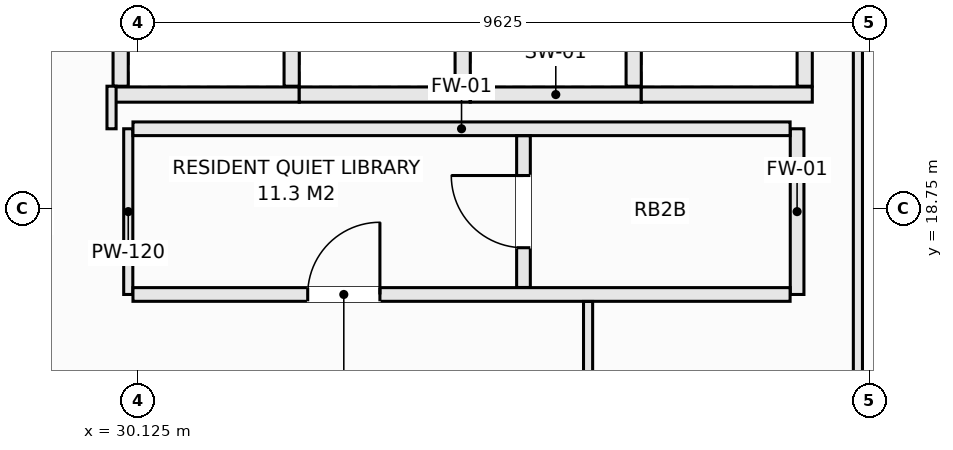
"""IFC4 building model, lengths in metres.
Left out: names, types, materials, properties, quantities, classifications, styles, units other than length and angle.
Written with IfcOpenShell. Run it as: python <this file> out.ifc"""

import sys

from ifc_helpers import new_model, si_unit, direction, frame, frame_2d, origin, place, context, subcontext, project, spatial, rectangle, extrude, element, fill, save


model = new_model("IFC4")
c1 = context("Model", 3, precision=1e-05, world=origin(), true_north=direction((0.0, 1.0)))
c2 = subcontext(c1, "Body", "Model", "MODEL_VIEW")
j1 = project(units=[si_unit("LENGTHUNIT", "METRE"), si_unit("PLANEANGLEUNIT", "RADIAN")], contexts=[c1])
p1 = place(None, origin())
s1 = spatial("IfcSite", under=j1, at=p1, CompositionType="ELEMENT")
p2 = place(p1, origin())
s2 = spatial("IfcBuilding", under=s1, at=p2, CompositionType="ELEMENT")
p3 = place(p2, frame((0.0, 0.0, 226.1)))
s3 = spatial("IfcBuildingStorey", under=s2, at=p3, CompositionType="ELEMENT", Elevation=226.1)
p4 = place(p3, frame((29.8, 20.25, 0.0), z_axis=(0.0, 0.0, 1.0), x_axis=(1.0, 0.0, 0.0)))
e1 = element("IfcWall", 1, at=p4, inside=s3, PredefinedType="SOLIDWALL", context=c2, shape_type="SweptSolid", body=[
    extrude(rectangle(XDim=2.45, YDim=0.2, at=frame_2d((1.225, 0.0))), origin(), (0.0, 0.0, 1.0), 3.03),
])
for number, where, z_axis, x_axis in (
    (2, (29.9, 20.36, 0.0), (0.0, 0.0, 1.0), (0.0, 1.0, 0.0)),
    (3, (32.15, 20.36, 0.0), (0.0, 0.0, 1.0), (0.0, 1.0, 0.0)),
):
    element("IfcWall", number, at=place(p3, frame(where, z_axis=z_axis, x_axis=x_axis)), inside=s3, PredefinedType="SOLIDWALL", context=c2, shape_type="SweptSolid", body=[
        extrude(rectangle(XDim=2.43, YDim=0.2, at=frame_2d((1.215, 0.0))), origin(), (0.0, 0.0, 1.0), 3.03),
    ])
p5 = place(p3, frame((32.25, 20.25, 0.0), z_axis=(0.0, 0.0, 1.0), x_axis=(1.0, 0.0, 0.0)))
e4 = element("IfcWall", 4, at=p5, inside=s3, PredefinedType="SOLIDWALL", context=c2, shape_type="SweptSolid", body=[
    extrude(rectangle(XDim=2.25, YDim=0.2, at=frame_2d((1.125, 0.0))), origin(), (0.0, 0.0, 1.0), 3.03),
])
p6 = place(p3, frame((34.4, 20.36, 0.0), z_axis=(0.0, 0.0, 1.0), x_axis=(0.0, 1.0, 0.0)))
e5 = element("IfcWall", 5, at=p6, inside=s3, PredefinedType="SOLIDWALL", context=c2, shape_type="SweptSolid", body=[
    extrude(rectangle(XDim=2.43, YDim=0.2, at=frame_2d((1.215, 0.0))), origin(), (0.0, 0.0, 1.0), 3.03),
])
p7 = place(p3, frame((34.5, 20.25, 0.0), z_axis=(0.0, 0.0, 1.0), x_axis=(1.0, 0.0, 0.0)))
e6 = element("IfcWall", 6, at=p7, inside=s3, PredefinedType="SOLIDWALL", context=c2, shape_type="SweptSolid", body=[
    extrude(rectangle(XDim=2.25, YDim=0.2, at=frame_2d((1.125, 0.0))), origin(), (0.0, 0.0, 1.0), 3.03),
])
p8 = place(p3, frame((36.65, 20.36, 0.0), z_axis=(0.0, 0.0, 1.0), x_axis=(0.0, 1.0, 0.0)))
e7 = element("IfcWall", 7, at=p8, inside=s3, PredefinedType="SOLIDWALL", context=c2, shape_type="SweptSolid", body=[
    extrude(rectangle(XDim=2.43, YDim=0.2, at=frame_2d((1.215, 0.0))), origin(), (0.0, 0.0, 1.0), 3.03),
])
p9 = place(p3, frame((36.75, 20.25, 0.0), z_axis=(0.0, 0.0, 1.0), x_axis=(1.0, 0.0, 0.0)))
e8 = element("IfcWall", 8, at=p9, inside=s3, PredefinedType="SOLIDWALL", context=c2, shape_type="SweptSolid", body=[
    extrude(rectangle(XDim=2.25, YDim=0.2, at=frame_2d((1.125, 0.0))), origin(), (0.0, 0.0, 1.0), 3.03),
])
p10 = place(p3, frame((38.9, 20.36, 0.0), z_axis=(0.0, 0.0, 1.0), x_axis=(0.0, 1.0, 0.0)))
e9 = element("IfcWall", 9, at=p10, inside=s3, PredefinedType="SOLIDWALL", context=c2, shape_type="SweptSolid", body=[
    extrude(rectangle(XDim=2.43, YDim=0.2, at=frame_2d((1.215, 0.0))), origin(), (0.0, 0.0, 1.0), 3.03),
])
p11 = place(p3, frame((30.0, 17.62, 0.0), z_axis=(0.0, 0.0, 1.0), x_axis=(0.0, 1.0, 0.0)))
e10 = element("IfcWall", 10, at=p11, inside=s3, PredefinedType="PARTITIONING", context=c2, shape_type="SweptSolid", body=[
    extrude(rectangle(XDim=2.18, YDim=0.12, at=frame_2d((1.09, 0.0))), origin(), (0.0, 0.0, 1.0), 3.03),
])
p12 = place(p3, frame((38.8, 17.62, 0.0), z_axis=(0.0, 0.0, 1.0), x_axis=(0.0, 1.0, 0.0)))
e11 = element("IfcWall", 11, at=p12, inside=s3, PredefinedType="SOLIDWALL", context=c2, shape_type="SweptSolid", body=[
    extrude(rectangle(XDim=2.18, YDim=0.18, at=frame_2d((1.09, 0.0))), origin(), (0.0, 0.0, 1.0), 3.03),
])
p13 = place(p3, frame((30.062, 17.62, 0.0), z_axis=(0.0, 0.0, 1.0), x_axis=(1.0, 0.0, 0.0)))
e12 = element("IfcWall", 12, at=p13, inside=s3, PredefinedType="SOLIDWALL", context=c2, shape_type="SweptSolid", body=[
    extrude(rectangle(XDim=8.646, YDim=0.18, at=frame_2d((4.323, 0.0))), origin(), (0.0, 0.0, 1.0), 3.03),
])
p14 = place(p13, frame((2.299, 0.0, 0.0)))
e13 = element("IfcOpeningElement", 13, at=p14, cuts=e12, PredefinedType="OPENING", context=c2, shape_type="SweptSolid", body=[
    extrude(rectangle(XDim=0.95, YDim=2.1, at=frame_2d((0.475, 1.05))), frame((0.0, 0.1, 0.0), z_axis=(0.0, -1.0, 0.0), x_axis=(1.0, 0.0, 0.0)), (0.0, 0.0, 1.0), 0.2),
])
p15 = place(p3, frame((30.062, 19.8, 0.0), z_axis=(0.0, 0.0, 1.0), x_axis=(1.0, 0.0, 0.0)))
e14 = element("IfcWall", 14, at=p15, inside=s3, PredefinedType="SOLIDWALL", context=c2, shape_type="SweptSolid", body=[
    extrude(rectangle(XDim=8.646, YDim=0.18, at=frame_2d((4.323, 0.0))), origin(), (0.0, 0.0, 1.0), 3.03),
])
p16 = place(p3, frame((35.2, 17.712, 0.0), z_axis=(0.0, 0.0, 1.0), x_axis=(0.0, 1.0, 0.0)))
e15 = element("IfcWall", 15, at=p16, inside=s3, PredefinedType="SOLIDWALL", context=c2, shape_type="SweptSolid", body=[
    extrude(rectangle(XDim=1.996, YDim=0.18, at=frame_2d((0.998, 0.0))), origin(), (0.0, 0.0, 1.0), 3.03),
])
p17 = place(p16, frame((0.523, 0.0, 0.0)))
e16 = element("IfcOpeningElement", 16, at=p17, cuts=e15, PredefinedType="OPENING", context=c2, shape_type="SweptSolid", body=[
    extrude(rectangle(XDim=0.95, YDim=2.1, at=frame_2d((0.475, 1.05))), frame((0.0, 0.1, 0.0), z_axis=(0.0, -1.0, 0.0), x_axis=(1.0, 0.0, 0.0)), (0.0, 0.0, 1.0), 0.2),
])
p18 = place(p3, frame((39.6, 16.5, 0.0), z_axis=(0.0, 0.0, 1.0), x_axis=(0.0, 1.0, 0.0)))
e17 = element("IfcWall", 17, at=p18, inside=s3, PredefinedType="PARTITIONING", context=c2, shape_type="SweptSolid", body=[
    extrude(rectangle(XDim=6.52, YDim=0.12, at=frame_2d((3.26, 0.0))), origin(), (0.0, 0.0, 1.0), 2.478),
])
p19 = place(p3, frame((29.78, 19.8, 0.0), z_axis=(0.0, 0.0, 1.0), x_axis=(0.0, 1.0, 0.0)))
e18 = element("IfcWall", 18, at=p19, inside=s3, PredefinedType="PARTITIONING", context=c2, shape_type="SweptSolid", body=[
    extrude(rectangle(XDim=0.56, YDim=0.12, at=frame_2d((0.28, 0.0))), origin(), (0.0, 0.0, 1.0), 3.03),
])
p20 = place(p3, frame((36.05, 14.95, 0.0), z_axis=(0.0, 0.0, 1.0), x_axis=(0.0, 1.0, 0.0)))
e19 = element("IfcWall", 19, at=p20, inside=s3, PredefinedType="PARTITIONING", context=c2, shape_type="SweptSolid", body=[
    extrude(rectangle(XDim=2.578, YDim=0.12, at=frame_2d((1.289, 0.0))), origin(), (0.0, 0.0, 1.0), 3.03),
])
p21 = place(p14, origin())
e20 = element("IfcDoor", 20, at=p21, inside=s3, OperationType="SINGLE_SWING_RIGHT", PredefinedType="DOOR", context=c2, shape_type="SweptSolid", body=[
    extrude(rectangle(XDim=0.95, YDim=2.1, at=frame_2d((0.475, 1.05))), frame((0.0, 0.025, 0.0), z_axis=(0.0, -1.0, 0.0), x_axis=(1.0, 0.0, 0.0)), (0.0, 0.0, 1.0), 0.05),
])
fill(e13, e20)
p22 = place(p17, origin())
e21 = element("IfcDoor", 21, at=p22, inside=s3, OperationType="SINGLE_SWING_RIGHT", PredefinedType="DOOR", context=c2, shape_type="SweptSolid", body=[
    extrude(rectangle(XDim=0.95, YDim=2.1, at=frame_2d((0.475, 1.05))), frame((0.0, 0.025, 0.0), z_axis=(0.0, -1.0, 0.0), x_axis=(1.0, 0.0, 0.0)), (0.0, 0.0, 1.0), 0.05),
])
fill(e16, e21)
save(model, sys.argv[1])
